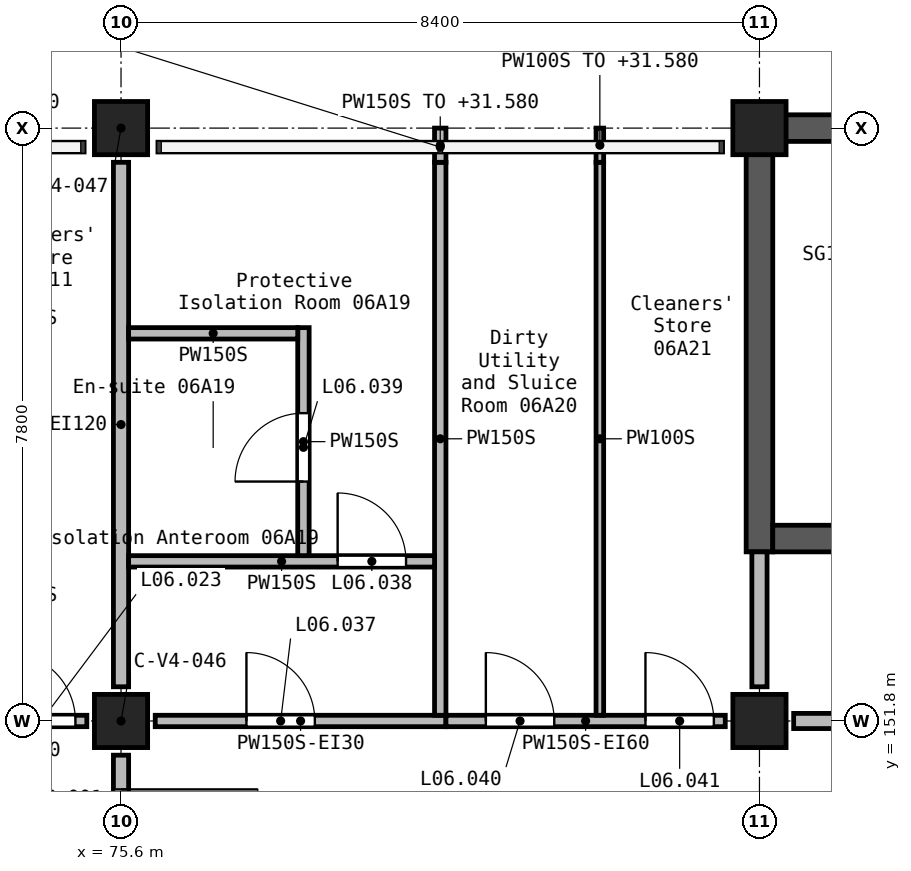
"""IFC4 building model, lengths in metres.
Left out: names, types, materials, properties, quantities, classifications, styles, units other than length and angle.
Written with IfcOpenShell. Run it as: python <this file> out.ifc"""

import sys

from ifc_helpers import new_model, si_unit, direction, frame, frame_2d, origin, origin_2d, place, context, subcontext, project, spatial, rectangle, extrude, element, fill, save


model = new_model("IFC4")
c1 = context("Model", 3, precision=1e-05, world=origin(), true_north=direction((0.0, 1.0)))
c2 = subcontext(c1, "Body", "Model", "MODEL_VIEW")
j1 = project(units=[si_unit("LENGTHUNIT", "METRE"), si_unit("PLANEANGLEUNIT", "RADIAN")], contexts=[c1])
p1 = place(None, origin())
s1 = spatial("IfcSite", under=j1, at=p1, CompositionType="ELEMENT")
p2 = place(p1, origin())
s2 = spatial("IfcBuilding", under=s1, at=p2, CompositionType="ELEMENT")
p3 = place(p2, frame((0.0, 0.0, 28.8)))
s3 = spatial("IfcBuildingStorey", under=s2, at=p3, CompositionType="ELEMENT", Elevation=28.8)
for number, where, z_axis, x_axis in (
    (1, (75.6, 151.8, 0.0), (0.0, 0.0, 1.0), (1.0, 0.0, 0.0)),
    (2, (75.6, 159.6, 0.0), (0.0, 0.0, 1.0), (1.0, 0.0, 0.0)),
    (3, (84.0, 151.8, 0.0), (0.0, 0.0, 1.0), (1.0, 0.0, 0.0)),
    (4, (84.0, 159.6, 0.0), (0.0, 0.0, 1.0), (1.0, 0.0, 0.0)),
):
    element("IfcColumn", number, at=place(p3, frame(where, z_axis=z_axis, x_axis=x_axis)), inside=s3, PredefinedType="COLUMN", context=c2, shape_type="SweptSolid", body=[
        extrude(rectangle(XDim=0.7, YDim=0.7, at=origin_2d()), origin(), (0.0, 0.0, 1.0), 3.9),
    ])
p4 = place(p3, frame((83.825, 159.6, 0.0), z_axis=(0.0, 0.0, 1.0), x_axis=(1.0, 0.0, 0.0)))
e5 = element("IfcWall", 5, at=p4, inside=s3, PredefinedType="SHEAR", context=c2, shape_type="SweptSolid", body=[
    extrude(rectangle(XDim=8.4, YDim=0.35, at=frame_2d((4.2, 0.0))), origin(), (0.0, 0.0, 1.0), 3.9),
])
p5 = place(p3, frame((84.0, 154.025, 0.0), z_axis=(0.0, 0.0, 1.0), x_axis=(0.0, 1.0, 0.0)))
e6 = element("IfcWall", 6, at=p5, inside=s3, PredefinedType="SHEAR", context=c2, shape_type="SweptSolid", body=[
    extrude(rectangle(XDim=5.4, YDim=0.35, at=frame_2d((2.7, 0.0))), origin(), (0.0, 0.0, 1.0), 3.9),
])
p6 = place(p3, frame((84.175, 154.2, 0.0), z_axis=(0.0, 0.0, 1.0), x_axis=(1.0, 0.0, 0.0)))
e7 = element("IfcWall", 7, at=p6, inside=s3, PredefinedType="SHEAR", context=c2, shape_type="SweptSolid", body=[
    extrude(rectangle(XDim=8.05, YDim=0.35, at=frame_2d((4.025, 0.0))), origin(), (0.0, 0.0, 1.0), 3.9),
])
p7 = place(p6, frame((6.525, 0.0, 0.0)))
e8 = element("IfcOpeningElement", 8, at=p7, cuts=e7, PredefinedType="OPENING", context=c2, shape_type="SweptSolid", body=[
    extrude(rectangle(XDim=1.1, YDim=2.1, at=frame_2d((0.55, 1.05))), frame((0.0, 0.185, 0.0), z_axis=(0.0, -1.0, 0.0), x_axis=(1.0, 0.0, 0.0)), (0.0, 0.0, 1.0), 0.37),
])
p8 = place(p3, frame((75.6, 159.15, 0.0), z_axis=(0.0, 0.0, 1.0), x_axis=(0.0, -1.0, 0.0)))
e9 = element("IfcWall", 9, at=p8, inside=s3, PredefinedType="SOLIDWALL", context=c2, shape_type="SweptSolid", body=[
    extrude(rectangle(XDim=6.9, YDim=0.2, at=frame_2d((3.45, 0.0))), origin(), (0.0, 0.0, 1.0), 3.6),
])
p9 = place(p3, frame((75.6, 151.35, 0.0), z_axis=(0.0, 0.0, 1.0), x_axis=(0.0, -1.0, 0.0)))
e10 = element("IfcWall", 10, at=p9, inside=s3, PredefinedType="SOLIDWALL", context=c2, shape_type="SweptSolid", body=[
    extrude(rectangle(XDim=2.7, YDim=0.2, at=frame_2d((1.35, 0.0))), origin(), (0.0, 0.0, 1.0), 3.6),
])
p10 = place(p9, frame((0.45, 0.0, 0.0)))
e11 = element("IfcOpeningElement", 11, at=p10, cuts=e10, PredefinedType="OPENING", context=c2, shape_type="SweptSolid", body=[
    extrude(rectangle(XDim=1.8, YDim=2.1, at=frame_2d((0.9, 1.05))), frame((0.0, 0.11, 0.0), z_axis=(0.0, -1.0, 0.0), x_axis=(1.0, 0.0, 0.0)), (0.0, 0.0, 1.0), 0.22),
])
p11 = place(p3, frame((84.45, 151.8, 0.0), z_axis=(0.0, 0.0, 1.0), x_axis=(1.0, 0.0, 0.0)))
e12 = element("IfcWall", 12, at=p11, inside=s3, PredefinedType="SOLIDWALL", context=c2, shape_type="SweptSolid", body=[
    extrude(rectangle(XDim=7.5, YDim=0.2, at=frame_2d((3.75, 0.0))), origin(), (0.0, 0.0, 1.0), 3.6),
])
p12 = place(p11, frame((3.2, 0.0, 0.0)))
e13 = element("IfcOpeningElement", 13, at=p12, cuts=e12, PredefinedType="OPENING", context=c2, shape_type="SweptSolid", body=[
    extrude(rectangle(XDim=1.1, YDim=2.1, at=frame_2d((0.55, 1.05))), frame((0.0, 0.11, 0.0), z_axis=(0.0, -1.0, 0.0), x_axis=(1.0, 0.0, 0.0)), (0.0, 0.0, 1.0), 0.22),
])
p13 = place(p3, frame((84.0, 152.25, 0.0), z_axis=(0.0, 0.0, 1.0), x_axis=(0.0, 1.0, 0.0)))
e14 = element("IfcWall", 14, at=p13, inside=s3, PredefinedType="SOLIDWALL", context=c2, shape_type="SweptSolid", body=[
    extrude(rectangle(XDim=1.775, YDim=0.2, at=frame_2d((0.887, 0.0))), origin(), (0.0, 0.0, 1.0), 3.6),
])
p14 = place(p3, frame((76.05, 151.8, 0.0), z_axis=(0.0, 0.0, 1.0), x_axis=(1.0, 0.0, 0.0)))
e15 = element("IfcWall", 15, at=p14, inside=s3, PredefinedType="PARTITIONING", context=c2, shape_type="SweptSolid", body=[
    extrude(rectangle(XDim=3.825, YDim=0.15, at=frame_2d((1.913, 0.0))), origin(), (0.0, 0.0, 1.0), 3.6),
])
p15 = place(p14, frame((1.2, 0.0, 0.0)))
e16 = element("IfcOpeningElement", 16, at=p15, cuts=e15, PredefinedType="OPENING", context=c2, shape_type="SweptSolid", body=[
    extrude(rectangle(XDim=0.9, YDim=2.1, at=frame_2d((0.45, 1.05))), frame((0.0, 0.085, 0.0), z_axis=(0.0, -1.0, 0.0), x_axis=(1.0, 0.0, 0.0)), (0.0, 0.0, 1.0), 0.17),
])
p16 = place(p3, frame((79.875, 151.8, 0.0), z_axis=(0.0, 0.0, 1.0), x_axis=(1.0, 0.0, 0.0)))
e17 = element("IfcWall", 17, at=p16, inside=s3, PredefinedType="PARTITIONING", context=c2, shape_type="SweptSolid", body=[
    extrude(rectangle(XDim=3.675, YDim=0.15, at=frame_2d((1.837, 0.0))), origin(), (0.0, 0.0, 1.0), 3.6),
])
p17 = place(p16, frame((0.525, 0.0, 0.0)))
e18 = element("IfcOpeningElement", 18, at=p17, cuts=e17, PredefinedType="OPENING", context=c2, shape_type="SweptSolid", body=[
    extrude(rectangle(XDim=0.9, YDim=2.1, at=frame_2d((0.45, 1.05))), frame((0.0, 0.085, 0.0), z_axis=(0.0, -1.0, 0.0), x_axis=(1.0, 0.0, 0.0)), (0.0, 0.0, 1.0), 0.17),
])
p18 = place(p16, frame((2.625, 0.0, 0.0)))
e19 = element("IfcOpeningElement", 19, at=p18, cuts=e17, PredefinedType="OPENING", context=c2, shape_type="SweptSolid", body=[
    extrude(rectangle(XDim=0.9, YDim=2.1, at=frame_2d((0.45, 1.05))), frame((0.0, 0.085, 0.0), z_axis=(0.0, -1.0, 0.0), x_axis=(1.0, 0.0, 0.0)), (0.0, 0.0, 1.0), 0.17),
])
p19 = place(p3, frame((73.575, 151.8, 0.0), z_axis=(0.0, 0.0, 1.0), x_axis=(1.0, 0.0, 0.0)))
e20 = element("IfcWall", 20, at=p19, inside=s3, PredefinedType="PARTITIONING", context=c2, shape_type="SweptSolid", body=[
    extrude(rectangle(XDim=1.575, YDim=0.15, at=frame_2d((0.788, 0.0))), origin(), (0.0, 0.0, 1.0), 3.6),
])
p20 = place(p19, frame((0.525, 0.0, 0.0)))
e21 = element("IfcOpeningElement", 21, at=p20, cuts=e20, PredefinedType="OPENING", context=c2, shape_type="SweptSolid", body=[
    extrude(rectangle(XDim=0.9, YDim=2.1, at=frame_2d((0.45, 1.05))), frame((0.0, 0.085, 0.0), z_axis=(0.0, -1.0, 0.0), x_axis=(1.0, 0.0, 0.0)), (0.0, 0.0, 1.0), 0.17),
])
p21 = place(p3, frame((79.8, 151.875, 0.0), z_axis=(0.0, 0.0, 1.0), x_axis=(0.0, 1.0, 0.0)))
e22 = element("IfcWall", 22, at=p21, inside=s3, PredefinedType="PARTITIONING", context=c2, shape_type="SweptSolid", body=[
    extrude(rectangle(XDim=7.275, YDim=0.15, at=frame_2d((3.637, 0.0))), origin(), (0.0, 0.0, 1.0), 3.6),
])
p22 = place(p3, frame((79.8, 159.15, 0.0), z_axis=(0.0, 0.0, 1.0), x_axis=(0.0, 1.0, 0.0)))
e23 = element("IfcWall", 23, at=p22, inside=s3, PredefinedType="PARTITIONING", context=c2, shape_type="SweptSolid", body=[
    extrude(rectangle(XDim=0.45, YDim=0.15, at=frame_2d((0.225, 0.0))), origin(), (0.0, 0.0, 1.0), 2.78),
])
p23 = place(p3, frame((75.7, 153.9, 0.0), z_axis=(0.0, 0.0, 1.0), x_axis=(1.0, 0.0, 0.0)))
e24 = element("IfcWall", 24, at=p23, inside=s3, PredefinedType="PARTITIONING", context=c2, shape_type="SweptSolid", body=[
    extrude(rectangle(XDim=4.025, YDim=0.15, at=frame_2d((2.013, 0.0))), origin(), (0.0, 0.0, 1.0), 3.6),
])
p24 = place(p23, frame((2.75, 0.0, 0.0)))
e25 = element("IfcOpeningElement", 25, at=p24, cuts=e24, PredefinedType="OPENING", context=c2, shape_type="SweptSolid", body=[
    extrude(rectangle(XDim=0.9, YDim=2.1, at=frame_2d((0.45, 1.05))), frame((0.0, 0.085, 0.0), z_axis=(0.0, -1.0, 0.0), x_axis=(1.0, 0.0, 0.0)), (0.0, 0.0, 1.0), 0.17),
])
p25 = place(p3, frame((78.0, 153.975, 0.0), z_axis=(0.0, 0.0, 1.0), x_axis=(0.0, 1.0, 0.0)))
e26 = element("IfcWall", 26, at=p25, inside=s3, PredefinedType="PARTITIONING", context=c2, shape_type="SweptSolid", body=[
    extrude(rectangle(XDim=3.0, YDim=0.15, at=frame_2d((1.5, 0.0))), origin(), (0.0, 0.0, 1.0), 3.6),
])
p26 = place(p25, frame((0.975, 0.0, 0.0)))
e27 = element("IfcOpeningElement", 27, at=p26, cuts=e26, PredefinedType="OPENING", context=c2, shape_type="SweptSolid", body=[
    extrude(rectangle(XDim=0.9, YDim=2.1, at=frame_2d((0.45, 1.05))), frame((0.0, 0.085, 0.0), z_axis=(0.0, -1.0, 0.0), x_axis=(1.0, 0.0, 0.0)), (0.0, 0.0, 1.0), 0.17),
])
p27 = place(p3, frame((75.7, 156.9, 0.0), z_axis=(0.0, 0.0, 1.0), x_axis=(1.0, 0.0, 0.0)))
e28 = element("IfcWall", 28, at=p27, inside=s3, PredefinedType="PARTITIONING", context=c2, shape_type="SweptSolid", body=[
    extrude(rectangle(XDim=2.225, YDim=0.15, at=frame_2d((1.113, 0.0))), origin(), (0.0, 0.0, 1.0), 3.6),
])
p28 = place(p3, frame((81.9, 151.875, 0.0), z_axis=(0.0, 0.0, 1.0), x_axis=(0.0, 1.0, 0.0)))
e29 = element("IfcWall", 29, at=p28, inside=s3, PredefinedType="PARTITIONING", context=c2, shape_type="SweptSolid", body=[
    extrude(rectangle(XDim=7.275, YDim=0.1, at=frame_2d((3.637, 0.0))), origin(), (0.0, 0.0, 1.0), 3.6),
])
p29 = place(p3, frame((81.9, 159.15, 0.0), z_axis=(0.0, 0.0, 1.0), x_axis=(0.0, 1.0, 0.0)))
e30 = element("IfcWall", 30, at=p29, inside=s3, PredefinedType="PARTITIONING", context=c2, shape_type="SweptSolid", body=[
    extrude(rectangle(XDim=0.45, YDim=0.1, at=frame_2d((0.225, 0.0))), origin(), (0.0, 0.0, 1.0), 2.78),
])
p30 = place(p10, origin())
e31 = element("IfcDoor", 31, at=p30, inside=s3, OperationType="DOUBLE_DOOR_SINGLE_SWING", PredefinedType="DOOR", context=c2, shape_type="SweptSolid", body=[
    extrude(rectangle(XDim=1.8, YDim=2.1, at=frame_2d((0.9, 1.05))), frame((0.0, 0.025, 0.0), z_axis=(0.0, -1.0, 0.0), x_axis=(1.0, 0.0, 0.0)), (0.0, 0.0, 1.0), 0.05),
])
fill(e11, e31)
p31 = place(p20, origin())
e32 = element("IfcDoor", 32, at=p31, inside=s3, OperationType="SINGLE_SWING_RIGHT", PredefinedType="DOOR", context=c2, shape_type="SweptSolid", body=[
    extrude(rectangle(XDim=0.9, YDim=2.1, at=frame_2d((0.45, 1.05))), frame((0.0, 0.025, 0.0), z_axis=(0.0, -1.0, 0.0), x_axis=(1.0, 0.0, 0.0)), (0.0, 0.0, 1.0), 0.05),
])
fill(e21, e32)
p32 = place(p15, origin())
e33 = element("IfcDoor", 33, at=p32, inside=s3, OperationType="SINGLE_SWING_LEFT", PredefinedType="DOOR", context=c2, shape_type="SweptSolid", body=[
    extrude(rectangle(XDim=0.9, YDim=2.1, at=frame_2d((0.45, 1.05))), frame((0.0, 0.025, 0.0), z_axis=(0.0, -1.0, 0.0), x_axis=(1.0, 0.0, 0.0)), (0.0, 0.0, 1.0), 0.05),
])
fill(e16, e33)
p33 = place(p24, origin())
e34 = element("IfcDoor", 34, at=p33, inside=s3, OperationType="SINGLE_SWING_RIGHT", PredefinedType="DOOR", context=c2, shape_type="SweptSolid", body=[
    extrude(rectangle(XDim=0.9, YDim=2.1, at=frame_2d((0.45, 1.05))), frame((0.0, 0.025, 0.0), z_axis=(0.0, -1.0, 0.0), x_axis=(1.0, 0.0, 0.0)), (0.0, 0.0, 1.0), 0.05),
])
fill(e25, e34)
p34 = place(p26, origin())
e35 = element("IfcDoor", 35, at=p34, inside=s3, OperationType="SINGLE_SWING_LEFT", PredefinedType="DOOR", context=c2, shape_type="SweptSolid", body=[
    extrude(rectangle(XDim=0.9, YDim=2.1, at=frame_2d((0.45, 1.05))), frame((0.0, 0.025, 0.0), z_axis=(0.0, -1.0, 0.0), x_axis=(1.0, 0.0, 0.0)), (0.0, 0.0, 1.0), 0.05),
])
fill(e27, e35)
p35 = place(p17, origin())
e36 = element("IfcDoor", 36, at=p35, inside=s3, OperationType="SINGLE_SWING_LEFT", PredefinedType="DOOR", context=c2, shape_type="SweptSolid", body=[
    extrude(rectangle(XDim=0.9, YDim=2.1, at=frame_2d((0.45, 1.05))), frame((0.0, 0.025, 0.0), z_axis=(0.0, -1.0, 0.0), x_axis=(1.0, 0.0, 0.0)), (0.0, 0.0, 1.0), 0.05),
])
fill(e18, e36)
p36 = place(p18, origin())
e37 = element("IfcDoor", 37, at=p36, inside=s3, OperationType="SINGLE_SWING_RIGHT", PredefinedType="DOOR", context=c2, shape_type="SweptSolid", body=[
    extrude(rectangle(XDim=0.9, YDim=2.1, at=frame_2d((0.45, 1.05))), frame((0.0, 0.025, 0.0), z_axis=(0.0, -1.0, 0.0), x_axis=(1.0, 0.0, 0.0)), (0.0, 0.0, 1.0), 0.05),
])
fill(e19, e37)
save(model, sys.argv[1])
